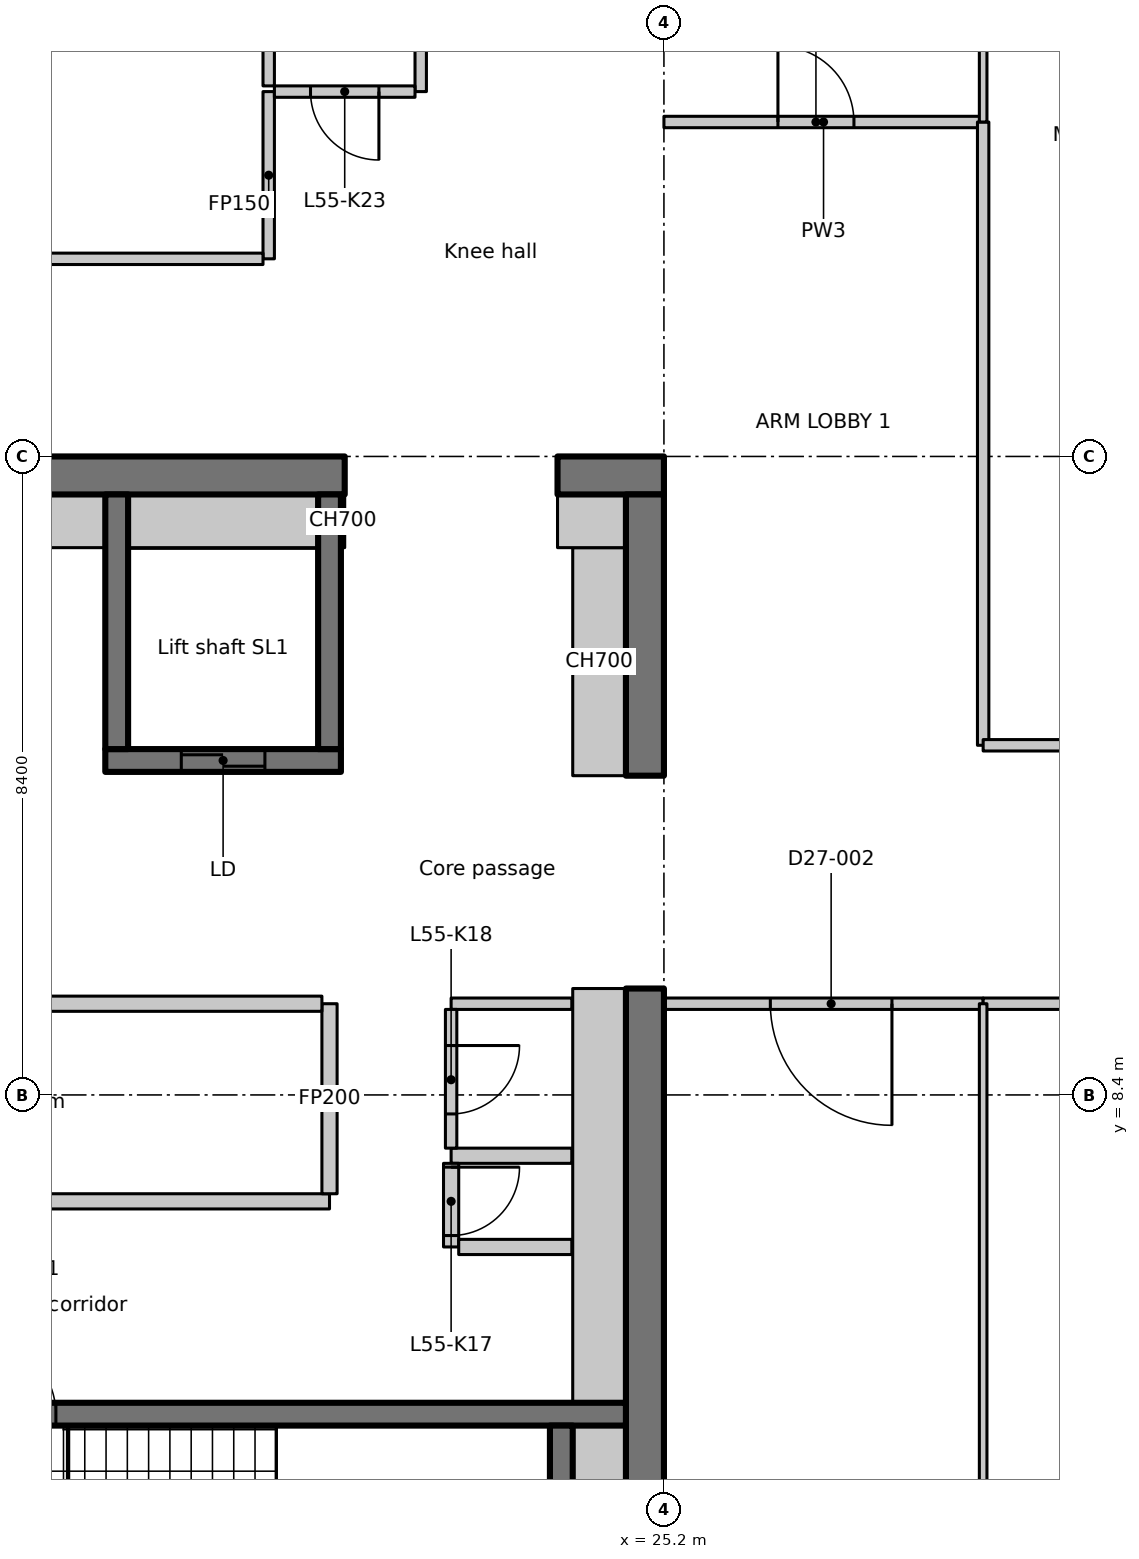
"""IFC4 building model, lengths in metres.
Left out: names, types, materials, properties, quantities, classifications, styles, units other than length and angle.
Written with IfcOpenShell. Run it as: python <this file> out.ifc"""

import sys

from ifc_helpers import new_model, si_unit, direction, frame, frame_2d, origin, place, context, subcontext, project, spatial, polyline, rectangle, outline, extrude, element, fill, save


model = new_model("IFC4")
c1 = context("Model", 3, precision=1e-05, world=origin(), true_north=direction((0.0, 1.0)))
c2 = subcontext(c1, "Body", "Model", "MODEL_VIEW")
j1 = project(units=[si_unit("LENGTHUNIT", "METRE"), si_unit("PLANEANGLEUNIT", "RADIAN")], contexts=[c1])
p1 = place(None, origin())
s1 = spatial("IfcSite", under=j1, at=p1, CompositionType="ELEMENT")
p2 = place(p1, origin())
s2 = spatial("IfcBuilding", under=s1, at=p2, CompositionType="ELEMENT")
p3 = place(p2, frame((0.0, 0.0, 219.3)))
s3 = spatial("IfcBuildingStorey", under=s2, at=p3, CompositionType="ELEMENT", Elevation=219.3)
p4 = place(p3, frame((-1.1, 16.55, 0.0), z_axis=(0.0, 0.0, 1.0), x_axis=(1.0, 0.0, 0.0)))
e1 = element("IfcWall", 1, at=p4, inside=s3, PredefinedType="SHEAR", context=c2, shape_type="SweptSolid", body=[
    extrude(rectangle(XDim=22.1, YDim=0.5, at=frame_2d((11.05, 0.0))), origin(), (0.0, 0.0, 1.0), 3.35),
])
p5 = place(p4, frame((3.15, 0.0, 0.0)))
e2 = element("IfcOpeningElement", 2, at=p5, cuts=e1, PredefinedType="OPENING", context=c2, shape_type="SweptSolid", body=[
    extrude(rectangle(XDim=1.1, YDim=2.3, at=frame_2d((0.55, 1.15))), frame((0.0, 0.26, 0.0), z_axis=(0.0, -1.0, 0.0), x_axis=(1.0, 0.0, 0.0)), (0.0, 0.0, 1.0), 0.52),
])
p6 = place(p3, frame((23.8, 16.55, 0.0), z_axis=(0.0, 0.0, 1.0), x_axis=(1.0, 0.0, 0.0)))
e3 = element("IfcWall", 3, at=p6, inside=s3, PredefinedType="SHEAR", context=c2, shape_type="SweptSolid", body=[
    extrude(rectangle(XDim=1.4, YDim=0.5, at=frame_2d((0.7, 0.0))), origin(), (0.0, 0.0, 1.0), 3.35),
])
p7 = place(p3, frame((24.95, 0.5, 0.0), z_axis=(0.0, 0.0, 1.0), x_axis=(0.0, 1.0, 0.0)))
e4 = element("IfcWall", 4, at=p7, inside=s3, PredefinedType="SHEAR", context=c2, shape_type="SweptSolid", body=[
    extrude(rectangle(XDim=9.3, YDim=0.5, at=frame_2d((4.65, 0.0))), origin(), (0.0, 0.0, 1.0), 3.35),
])
p8 = place(p3, frame((24.95, 12.6, 0.0), z_axis=(0.0, 0.0, 1.0), x_axis=(0.0, 1.0, 0.0)))
e5 = element("IfcWall", 5, at=p8, inside=s3, PredefinedType="SHEAR", context=c2, shape_type="SweptSolid", body=[
    extrude(rectangle(XDim=3.7, YDim=0.5, at=frame_2d((1.85, 0.0))), origin(), (0.0, 0.0, 1.0), 3.35),
])
p9 = place(p3, frame((24.35, 12.6, 0.0), z_axis=(0.0, 0.0, 1.0), x_axis=(0.0, 1.0, 0.0)))
e6 = element("IfcWall", 6, at=p9, inside=s3, PredefinedType="PARTITIONING", context=c2, shape_type="SweptSolid", body=[
    extrude(rectangle(XDim=3.0, YDim=0.7, at=frame_2d((1.5, 0.0))), origin(), (0.0, 0.0, 1.0), 3.35),
])
p10 = place(p3, frame((23.8, 15.95, 0.0), z_axis=(0.0, 0.0, 1.0), x_axis=(1.0, 0.0, 0.0)))
e7 = element("IfcWall", 7, at=p10, inside=s3, PredefinedType="PARTITIONING", context=c2, shape_type="SweptSolid", body=[
    extrude(rectangle(XDim=0.9, YDim=0.7, at=frame_2d((0.45, 0.0))), origin(), (0.0, 0.0, 1.0), 3.35),
])
p11 = place(p3, frame((17.85, 12.8, 0.0), z_axis=(0.0, 0.0, 1.0), x_axis=(1.0, 0.0, 0.0)))
e8 = element("IfcWall", 8, at=p11, inside=s3, PredefinedType="SHEAR", context=c2, shape_type="SweptSolid", body=[
    extrude(rectangle(XDim=3.1, YDim=0.3, at=frame_2d((1.55, 0.0))), origin(), (0.0, 0.0, 1.0), 3.35),
])
p12 = place(p11, frame((1.0, 0.0, 0.0)))
e9 = element("IfcOpeningElement", 9, at=p12, cuts=e8, PredefinedType="OPENING", context=c2, shape_type="SweptSolid", body=[
    extrude(rectangle(XDim=1.1, YDim=2.3, at=frame_2d((0.55, 1.15))), frame((0.0, 0.16, 0.0), z_axis=(0.0, -1.0, 0.0), x_axis=(1.0, 0.0, 0.0)), (0.0, 0.0, 1.0), 0.32),
])
for number, where, z_axis, x_axis in (
    (10, (18.0, 12.95, 0.0), (0.0, 0.0, 1.0), (0.0, 1.0, 0.0)),
    (11, (20.8, 12.95, 0.0), (0.0, 0.0, 1.0), (0.0, 1.0, 0.0)),
):
    element("IfcWall", number, at=place(p3, frame(where, z_axis=z_axis, x_axis=x_axis)), inside=s3, PredefinedType="SHEAR", context=c2, shape_type="SweptSolid", body=[
        extrude(rectangle(XDim=3.35, YDim=0.3, at=frame_2d((1.675, 0.0))), origin(), (0.0, 0.0, 1.0), 3.35),
    ])
p13 = place(p3, frame((15.8, 4.2, 0.0), z_axis=(0.0, 0.0, 1.0), x_axis=(1.0, 0.0, 0.0)))
e12 = element("IfcWall", 12, at=p13, inside=s3, PredefinedType="SHEAR", context=c2, shape_type="SweptSolid", body=[
    extrude(rectangle(XDim=8.9, YDim=0.3, at=frame_2d((4.45, 0.0))), origin(), (0.0, 0.0, 1.0), 3.35),
])
p14 = place(p13, frame((0.4, 0.0, 0.0)))
e13 = element("IfcOpeningElement", 13, at=p14, cuts=e12, PredefinedType="OPENING", context=c2, shape_type="SweptSolid", body=[
    extrude(rectangle(XDim=1.0, YDim=2.1, at=frame_2d((0.5, 1.05))), frame((0.0, 0.16, 0.0), z_axis=(0.0, -1.0, 0.0), x_axis=(1.0, 0.0, 0.0)), (0.0, 0.0, 1.0), 0.32),
])
p15 = place(p3, frame((23.85, 1.5, 0.0), z_axis=(0.0, 0.0, 1.0), x_axis=(0.0, 1.0, 0.0)))
e14 = element("IfcWall", 14, at=p15, inside=s3, PredefinedType="SHEAR", context=c2, shape_type="SweptSolid", body=[
    extrude(rectangle(XDim=2.55, YDim=0.3, at=frame_2d((1.275, 0.0))), origin(), (0.0, 0.0, 1.0), 3.35),
])
p16 = place(p3, frame((12.4, 7.0, 0.0), z_axis=(0.0, 0.0, 1.0), x_axis=(1.0, 0.0, 0.0)))
e15 = element("IfcWall", 15, at=p16, inside=s3, PredefinedType="PARTITIONING", context=c2, shape_type="SweptSolid", body=[
    extrude(rectangle(XDim=8.4, YDim=0.2, at=frame_2d((4.2, 0.0))), origin(), (0.0, 0.0, 1.0), 3.35),
])
p17 = place(p3, frame((20.8, 7.1, 0.0), z_axis=(0.0, 0.0, 1.0), x_axis=(0.0, 1.0, 0.0)))
e16 = element("IfcWall", 16, at=p17, inside=s3, PredefinedType="PARTITIONING", context=c2, shape_type="SweptSolid", body=[
    extrude(rectangle(XDim=2.5, YDim=0.2, at=frame_2d((1.25, 0.0))), origin(), (0.0, 0.0, 1.0), 3.35),
])
p18 = place(p3, frame((20.7, 9.6, 0.0), z_axis=(0.0, 0.0, 1.0), x_axis=(-1.0, 0.0, 0.0)))
e17 = element("IfcWall", 17, at=p18, inside=s3, PredefinedType="PARTITIONING", context=c2, shape_type="SweptSolid", body=[
    extrude(rectangle(XDim=8.3, YDim=0.2, at=frame_2d((4.15, 0.0))), origin(), (0.0, 0.0, 1.0), 3.35),
])
p19 = place(p18, frame((3.65, 0.0, 0.0)))
e18 = element("IfcOpeningElement", 18, at=p19, cuts=e17, PredefinedType="OPENING", context=c2, shape_type="SweptSolid", body=[
    extrude(rectangle(XDim=0.9, YDim=2.1, at=frame_2d((0.45, 1.05))), frame((0.0, 0.11, 0.0), z_axis=(0.0, -1.0, 0.0), x_axis=(1.0, 0.0, 0.0)), (0.0, 0.0, 1.0), 0.22),
])
p20 = place(p3, frame((23.988, 7.6, 0.0), z_axis=(0.0, 0.0, 1.0), x_axis=(-1.0, 0.0, 0.0)))
e19 = element("IfcWall", 19, at=p20, inside=s3, PredefinedType="PARTITIONING", context=c2, shape_type="SweptSolid", body=[
    extrude(rectangle(XDim=1.588, YDim=0.2, at=frame_2d((0.794, 0.0))), origin(), (0.0, 0.0, 1.0), 3.35),
])
p21 = place(p3, frame((22.4, 7.5, 0.0), z_axis=(0.0, 0.0, 1.0), x_axis=(0.0, -1.0, 0.0)))
e20 = element("IfcWall", 20, at=p21, inside=s3, PredefinedType="PARTITIONING", context=c2, shape_type="SweptSolid", body=[
    extrude(rectangle(XDim=1.1, YDim=0.2, at=frame_2d((0.55, 0.0))), origin(), (0.0, 0.0, 1.0), 3.35),
])
p22 = place(p21, frame((0.05, 0.0, 0.0)))
e21 = element("IfcOpeningElement", 21, at=p22, cuts=e20, PredefinedType="OPENING", context=c2, shape_type="SweptSolid", body=[
    extrude(rectangle(XDim=0.9, YDim=2.1, at=frame_2d((0.45, 1.05))), frame((0.0, 0.11, 0.0), z_axis=(0.0, -1.0, 0.0), x_axis=(1.0, 0.0, 0.0)), (0.0, 0.0, 1.0), 0.22),
])
p23 = place(p3, frame((22.5, 6.4, 0.0), z_axis=(0.0, 0.0, 1.0), x_axis=(1.0, 0.0, 0.0)))
e22 = element("IfcWall", 22, at=p23, inside=s3, PredefinedType="PARTITIONING", context=c2, shape_type="SweptSolid", body=[
    extrude(rectangle(XDim=1.488, YDim=0.2, at=frame_2d((0.744, 0.0))), origin(), (0.0, 0.0, 1.0), 3.35),
])
p24 = place(p3, frame((20.0, 21.6, 0.0), z_axis=(0.0, 0.0, 1.0), x_axis=(0.0, -1.0, 0.0)))
e23 = element("IfcWall", 23, at=p24, inside=s3, PredefinedType="PARTITIONING", context=c2, shape_type="SweptSolid", body=[
    extrude(rectangle(XDim=2.2, YDim=0.15, at=frame_2d((1.1, 0.0))), origin(), (0.0, 0.0, 1.0), 3.35),
])
p25 = place(p3, frame((19.925, 19.4, 0.0), z_axis=(0.0, 0.0, 1.0), x_axis=(-1.0, 0.0, 0.0)))
e24 = element("IfcWall", 24, at=p25, inside=s3, PredefinedType="PARTITIONING", context=c2, shape_type="SweptSolid", body=[
    extrude(rectangle(XDim=11.425, YDim=0.15, at=frame_2d((5.712, 0.0))), origin(), (0.0, 0.0, 1.0), 3.35),
])
p26 = place(p25, frame((5.175, 0.0, 0.0)))
e25 = element("IfcOpeningElement", 25, at=p26, cuts=e24, PredefinedType="OPENING", context=c2, shape_type="SweptSolid", body=[
    extrude(rectangle(XDim=1.0, YDim=2.1, at=frame_2d((0.5, 1.05))), frame((0.0, 0.085, 0.0), z_axis=(0.0, -1.0, 0.0), x_axis=(1.0, 0.0, 0.0)), (0.0, 0.0, 1.0), 0.17),
])
p27 = place(p3, frame((22.0, 23.925, 0.0), z_axis=(0.0, 0.0, 1.0), x_axis=(0.0, -1.0, 0.0)))
e26 = element("IfcWall", 26, at=p27, inside=s3, PredefinedType="PARTITIONING", context=c2, shape_type="SweptSolid", body=[
    extrude(rectangle(XDim=2.325, YDim=0.15, at=frame_2d((1.163, 0.0))), origin(), (0.0, 0.0, 1.0), 3.35),
])
p28 = place(p3, frame((21.925, 21.6, 0.0), z_axis=(0.0, 0.0, 1.0), x_axis=(-1.0, 0.0, 0.0)))
e27 = element("IfcWall", 27, at=p28, inside=s3, PredefinedType="PARTITIONING", context=c2, shape_type="SweptSolid", body=[
    extrude(rectangle(XDim=1.85, YDim=0.15, at=frame_2d((0.925, 0.0))), origin(), (0.0, 0.0, 1.0), 3.35),
])
p29 = place(p28, frame((0.475, 0.0, 0.0)))
e28 = element("IfcOpeningElement", 28, at=p29, cuts=e27, PredefinedType="OPENING", context=c2, shape_type="SweptSolid", body=[
    extrude(rectangle(XDim=0.9, YDim=2.1, at=frame_2d((0.45, 1.05))), frame((0.0, 0.085, 0.0), z_axis=(0.0, -1.0, 0.0), x_axis=(1.0, 0.0, 0.0)), (0.0, 0.0, 1.0), 0.17),
])
p30 = place(p3, frame((20.0, 21.675, 0.0), z_axis=(0.0, 0.0, 1.0), x_axis=(0.0, 1.0, 0.0)))
e29 = element("IfcWall", 29, at=p30, inside=s3, PredefinedType="PARTITIONING", context=c2, shape_type="SweptSolid", body=[
    extrude(rectangle(XDim=2.15, YDim=0.15, at=frame_2d((1.075, 0.0))), origin(), (0.0, 0.0, 1.0), 3.35),
])
p31 = place(p3, frame((23.988, 9.6, 0.0), z_axis=(0.0, 0.0, 1.0), x_axis=(-1.0, 0.0, 0.0)))
e30 = element("IfcWall", 30, at=p31, inside=s3, PredefinedType="PARTITIONING", context=c2, shape_type="SweptSolid", body=[
    extrude(rectangle(XDim=1.588, YDim=0.15, at=frame_2d((0.794, 0.0))), origin(), (0.0, 0.0, 1.0), 3.35),
])
p32 = place(p3, frame((22.4, 9.525, 0.0), z_axis=(0.0, 0.0, 1.0), x_axis=(0.0, -1.0, 0.0)))
e31 = element("IfcWall", 31, at=p32, inside=s3, PredefinedType="PARTITIONING", context=c2, shape_type="SweptSolid", body=[
    extrude(rectangle(XDim=1.825, YDim=0.15, at=frame_2d((0.913, 0.0))), origin(), (0.0, 0.0, 1.0), 3.35),
])
p33 = place(p32, frame((0.475, 0.0, 0.0)))
e32 = element("IfcOpeningElement", 32, at=p33, cuts=e31, PredefinedType="OPENING", context=c2, shape_type="SweptSolid", body=[
    extrude(rectangle(XDim=0.9, YDim=2.1, at=frame_2d((0.45, 1.05))), frame((0.0, 0.085, 0.0), z_axis=(0.0, -1.0, 0.0), x_axis=(1.0, 0.0, 0.0)), (0.0, 0.0, 1.0), 0.17),
])
for number, where, z_axis, x_axis in (
    (33, (15.35, 15.95, 0.0), (0.0, 0.0, 1.0), (1.0, 0.0, 0.0)),
    (34, (18.15, 15.95, 0.0), (0.0, 0.0, 1.0), (1.0, 0.0, 0.0)),
):
    element("IfcWall", number, at=place(p3, frame(where, z_axis=z_axis, x_axis=x_axis)), inside=s3, PredefinedType="PARTITIONING", context=c2, shape_type="SweptSolid", body=[
        extrude(rectangle(XDim=2.5, YDim=0.7, at=frame_2d((1.25, 0.0))), origin(), (0.0, 0.0, 1.0), 3.35),
    ])
p34 = place(p3, frame((20.95, 15.95, 0.0), z_axis=(0.0, 0.0, 1.0), x_axis=(1.0, 0.0, 0.0)))
e35 = element("IfcWall", 35, at=p34, inside=s3, PredefinedType="PARTITIONING", context=c2, shape_type="SweptSolid", body=[
    extrude(rectangle(XDim=0.05, YDim=0.7, at=frame_2d((0.025, 0.0))), origin(), (0.0, 0.0, 1.0), 3.35),
])
p35 = place(p3, frame((24.35, 1.5, 0.0), z_axis=(0.0, 0.0, 1.0), x_axis=(0.0, 1.0, 0.0)))
e36 = element("IfcWall", 36, at=p35, inside=s3, PredefinedType="PARTITIONING", context=c2, shape_type="SweptSolid", body=[
    extrude(rectangle(XDim=2.55, YDim=0.7, at=frame_2d((1.275, 0.0))), origin(), (0.0, 0.0, 1.0), 3.35),
])
p36 = place(p3, frame((24.35, 4.35, 0.0), z_axis=(0.0, 0.0, 1.0), x_axis=(0.0, 1.0, 0.0)))
e37 = element("IfcWall", 37, at=p36, inside=s3, PredefinedType="PARTITIONING", context=c2, shape_type="SweptSolid", body=[
    extrude(rectangle(XDim=5.45, YDim=0.7, at=frame_2d((2.725, 0.0))), origin(), (0.0, 0.0, 1.0), 3.35),
])
p37 = place(p3, frame((25.2, 21.2, 0.0), z_axis=(0.0, 0.0, 1.0), x_axis=(1.0, 0.0, 0.0)))
e38 = element("IfcWall", 38, at=p37, inside=s3, PredefinedType="PARTITIONING", context=c2, shape_type="SweptSolid", body=[
    extrude(rectangle(XDim=4.2, YDim=0.15, at=frame_2d((2.1, 0.0))), origin(), (0.0, 0.0, 1.0), 3.33),
])
p38 = place(p37, frame((1.5, 0.0, 0.0)))
e39 = element("IfcOpeningElement", 39, at=p38, cuts=e38, PredefinedType="OPENING", context=c2, shape_type="SweptSolid", body=[
    extrude(rectangle(XDim=1.0, YDim=2.1, at=frame_2d((0.5, 1.05))), frame((0.0, 0.085, 0.0), z_axis=(0.0, -1.0, 0.0), x_axis=(1.0, 0.0, 0.0)), (0.0, 0.0, 1.0), 0.17),
])
p39 = place(p3, frame((29.4, 9.6, 0.0), z_axis=(0.0, 0.0, 1.0), x_axis=(-1.0, 0.0, 0.0)))
e40 = element("IfcWall", 40, at=p39, inside=s3, PredefinedType="PARTITIONING", context=c2, shape_type="SweptSolid", body=[
    extrude(rectangle(XDim=4.2, YDim=0.15, at=frame_2d((2.1, 0.0))), origin(), (0.0, 0.0, 1.0), 3.33),
])
p40 = place(p39, frame((1.2, 0.0, 0.0)))
e41 = element("IfcOpeningElement", 41, at=p40, cuts=e40, PredefinedType="OPENING", context=c2, shape_type="SweptSolid", body=[
    extrude(rectangle(XDim=1.6, YDim=2.1, at=frame_2d((0.8, 1.05))), frame((0.0, 0.085, 0.0), z_axis=(0.0, -1.0, 0.0), x_axis=(1.0, 0.0, 0.0)), (0.0, 0.0, 1.0), 0.17),
])
p41 = place(p3, frame((29.4, 21.2, 0.0), z_axis=(0.0, 0.0, 1.0), x_axis=(0.0, -1.0, 0.0)))
e42 = element("IfcWall", 42, at=p41, inside=s3, PredefinedType="PARTITIONING", context=c2, shape_type="SweptSolid", body=[
    extrude(rectangle(XDim=8.2, YDim=0.15, at=frame_2d((4.1, 0.0))), origin(), (0.0, 0.0, 1.0), 3.33),
])
p42 = place(p3, frame((29.4, 27.511, 0.0), z_axis=(0.0, 0.0, 1.0), x_axis=(0.0, -1.0, 0.0)))
e43 = element("IfcWall", 43, at=p42, inside=s3, PredefinedType="PARTITIONING", context=c2, shape_type="SweptSolid", body=[
    extrude(outline(polyline([(0.0, 0.0), (6.311, 0.0), (6.311, 3.33), (2.761, 3.33), (2.759, 2.98), (1.863, 2.98), (1.861, 3.33), (0.236, 3.33), (0.0, 3.33), (0.0, 0.0)])), frame((0.0, 0.05, 0.0), z_axis=(0.0, -1.0, 0.0), x_axis=(1.0, 0.0, 0.0)), (0.0, 0.0, 1.0), 0.1),
])
for number, where, z_axis, x_axis in (
    (44, (33.6, 9.6, 0.0), (0.0, 0.0, 1.0), (-1.0, 0.0, 0.0)),
    (45, (29.4, 13.0, 0.0), (0.0, 0.0, 1.0), (1.0, 0.0, 0.0)),
):
    element("IfcWall", number, at=place(p3, frame(where, z_axis=z_axis, x_axis=x_axis)), inside=s3, PredefinedType="PARTITIONING", context=c2, shape_type="SweptSolid", body=[
        extrude(rectangle(XDim=4.2, YDim=0.15, at=frame_2d((2.1, 0.0))), origin(), (0.0, 0.0, 1.0), 3.33),
    ])
p43 = place(p3, frame((29.4, 9.6, 0.0), z_axis=(0.0, 0.0, 1.0), x_axis=(0.0, -1.0, 0.0)))
e46 = element("IfcWall", 46, at=p43, inside=s3, PredefinedType="PARTITIONING", context=c2, shape_type="SweptSolid", body=[
    extrude(outline(polyline([(0.0, 0.0), (12.6, 0.0), (12.6, 3.33), (10.05, 3.33), (10.048, 2.98), (9.152, 2.98), (9.15, 3.33), (0.0, 3.33), (0.0, 0.0)])), frame((0.0, 0.05, 0.0), z_axis=(0.0, -1.0, 0.0), x_axis=(1.0, 0.0, 0.0)), (0.0, 0.0, 1.0), 0.1),
])
p44 = place(p12, origin())
e47 = element("IfcDoor", 47, at=p44, inside=s3, OperationType="SLIDING_TO_LEFT", PredefinedType="DOOR", context=c2, shape_type="SweptSolid", body=[
    extrude(rectangle(XDim=1.1, YDim=2.3, at=frame_2d((0.55, 1.15))), frame((0.0, 0.025, 0.0), z_axis=(0.0, -1.0, 0.0), x_axis=(1.0, 0.0, 0.0)), (0.0, 0.0, 1.0), 0.05),
])
fill(e9, e47)
p45 = place(p14, origin())
e48 = element("IfcDoor", 48, at=p45, inside=s3, OperationType="SINGLE_SWING_LEFT", PredefinedType="DOOR", context=c2, shape_type="SweptSolid", body=[
    extrude(rectangle(XDim=1.0, YDim=2.1, at=frame_2d((0.5, 1.05))), frame((0.0, 0.025, 0.0), z_axis=(0.0, -1.0, 0.0), x_axis=(1.0, 0.0, 0.0)), (0.0, 0.0, 1.0), 0.05),
])
fill(e13, e48)
p46 = place(p22, origin())
e49 = element("IfcDoor", 49, at=p46, inside=s3, OperationType="SINGLE_SWING_LEFT", PredefinedType="DOOR", context=c2, shape_type="SweptSolid", body=[
    extrude(rectangle(XDim=0.9, YDim=2.1, at=frame_2d((0.45, 1.05))), frame((0.0, 0.025, 0.0), z_axis=(0.0, -1.0, 0.0), x_axis=(1.0, 0.0, 0.0)), (0.0, 0.0, 1.0), 0.05),
])
fill(e21, e49)
p47 = place(p33, origin())
e50 = element("IfcDoor", 50, at=p47, inside=s3, OperationType="SINGLE_SWING_RIGHT", PredefinedType="DOOR", context=c2, shape_type="SweptSolid", body=[
    extrude(rectangle(XDim=0.9, YDim=2.1, at=frame_2d((0.45, 1.05))), frame((0.0, 0.025, 0.0), z_axis=(0.0, -1.0, 0.0), x_axis=(1.0, 0.0, 0.0)), (0.0, 0.0, 1.0), 0.05),
])
fill(e32, e50)
p48 = place(p29, origin())
e51 = element("IfcDoor", 51, at=p48, inside=s3, OperationType="SINGLE_SWING_LEFT", PredefinedType="DOOR", context=c2, shape_type="SweptSolid", body=[
    extrude(rectangle(XDim=0.9, YDim=2.1, at=frame_2d((0.45, 1.05))), frame((0.0, 0.025, 0.0), z_axis=(0.0, -1.0, 0.0), x_axis=(1.0, 0.0, 0.0)), (0.0, 0.0, 1.0), 0.05),
])
fill(e28, e51)
p49 = place(p38, origin())
e52 = element("IfcDoor", 52, at=p49, inside=s3, OperationType="SINGLE_SWING_LEFT", PredefinedType="DOOR", context=c2, shape_type="SweptSolid", body=[
    extrude(rectangle(XDim=1.0, YDim=2.1, at=frame_2d((0.5, 1.05))), frame((0.0, 0.025, 0.0), z_axis=(0.0, -1.0, 0.0), x_axis=(1.0, 0.0, 0.0)), (0.0, 0.0, 1.0), 0.05),
])
fill(e39, e52)
p50 = place(p40, origin())
e53 = element("IfcDoor", 53, at=p50, inside=s3, OperationType="DOUBLE_DOOR_SINGLE_SWING", PredefinedType="DOOR", context=c2, shape_type="SweptSolid", body=[
    extrude(rectangle(XDim=1.6, YDim=2.1, at=frame_2d((0.8, 1.05))), frame((0.0, 0.025, 0.0), z_axis=(0.0, -1.0, 0.0), x_axis=(1.0, 0.0, 0.0)), (0.0, 0.0, 1.0), 0.05),
])
fill(e41, e53)
save(model, sys.argv[1])
